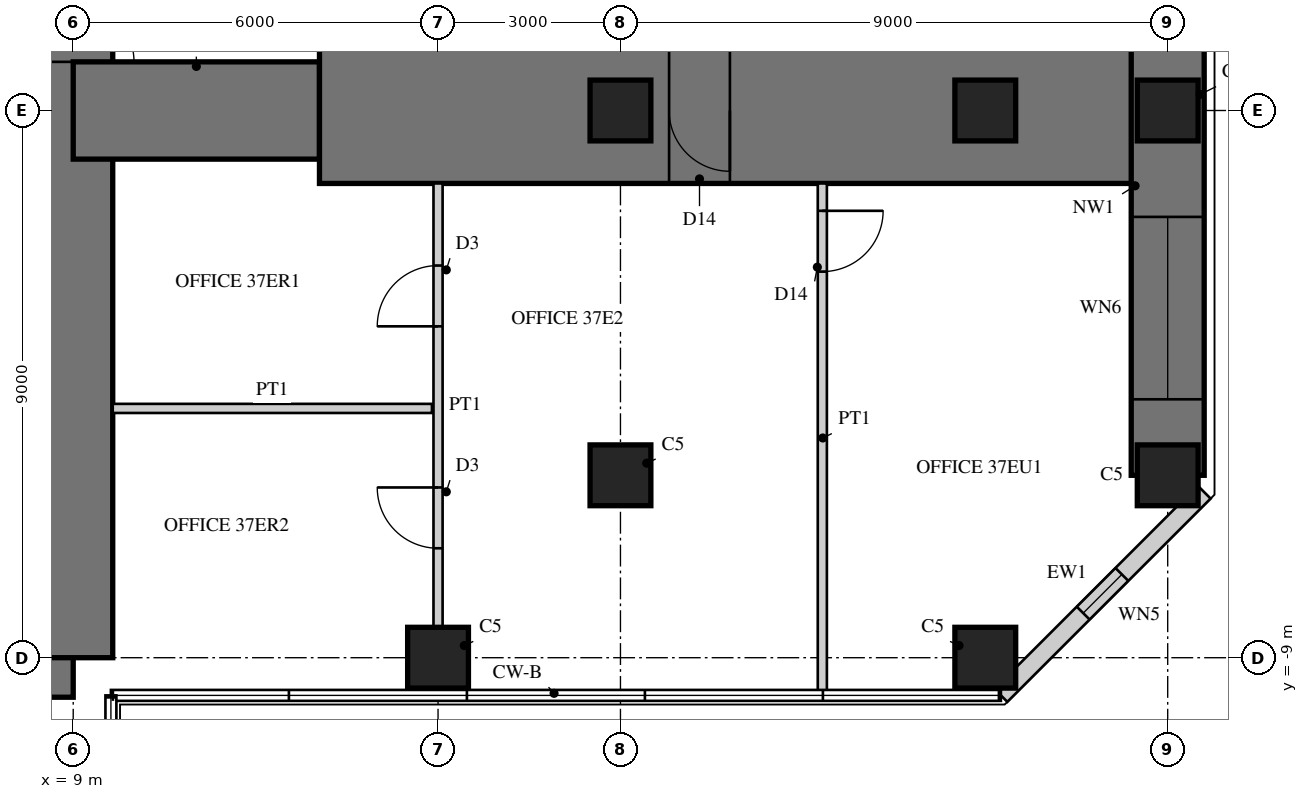
"""IFC4 building model, lengths in metres.
Left out: names, types, materials, properties, quantities, classifications, styles, units other than length and angle.
Written with IfcOpenShell. Run it as: python <this file> out.ifc"""

import sys

from ifc_helpers import new_model, si_unit, direction, frame, frame_2d, origin, origin_2d, place, context, subcontext, project, spatial, rectangle, hollow_rectangle, extrude, element, fill, save


model = new_model("IFC4")
c1 = context("Model", 3, precision=1e-05, world=origin(), true_north=direction((0.0, 1.0)))
c2 = subcontext(c1, "Body", "Model", "MODEL_VIEW")
j1 = project(units=[si_unit("LENGTHUNIT", "METRE"), si_unit("PLANEANGLEUNIT", "RADIAN")], contexts=[c1])
p1 = place(None, origin())
s1 = spatial("IfcSite", under=j1, at=p1, CompositionType="ELEMENT")
p2 = place(p1, origin())
s2 = spatial("IfcBuilding", under=s1, at=p2, CompositionType="ELEMENT")
p3 = place(p2, frame((0.0, 0.0, 152.5)))
s3 = spatial("IfcBuildingStorey", under=s2, at=p3, CompositionType="ELEMENT", Elevation=152.5)
p4 = place(p3, frame((-9.0, -9.0, 0.0), z_axis=(0.0, 0.0, 1.0), x_axis=(1.0, 0.0, 0.0)))
e1 = element("IfcWall", 1, at=p4, inside=s3, PredefinedType="SHEAR", context=c2, shape_type="SweptSolid", body=[
    extrude(rectangle(XDim=18.0, YDim=1.3, at=frame_2d((9.0, 0.0))), origin(), (0.0, 0.0, 1.0), 4.0),
])
p5 = place(p4, frame((9.8, 0.0, 0.0)))
e2 = element("IfcOpeningElement", 2, at=p5, cuts=e1, PredefinedType="OPENING", context=c2, shape_type="SweptSolid", body=[
    extrude(rectangle(XDim=1.0, YDim=2.4, at=frame_2d((0.5, 1.2))), frame((0.0, 0.66, 0.0), z_axis=(0.0, -1.0, 0.0), x_axis=(1.0, 0.0, 0.0)), (0.0, 0.0, 1.0), 1.32),
])
p6 = place(p3, frame((9.0, -9.0, 0.0), z_axis=(0.0, 0.0, 1.0), x_axis=(0.0, 1.0, 0.0)))
e3 = element("IfcWall", 3, at=p6, inside=s3, PredefinedType="SHEAR", context=c2, shape_type="SweptSolid", body=[
    extrude(rectangle(XDim=18.0, YDim=1.3, at=frame_2d((9.0, 0.0))), origin(), (0.0, 0.0, 1.0), 4.0),
])
p7 = place(p6, frame((9.8, 0.0, 0.0)))
e4 = element("IfcOpeningElement", 4, at=p7, cuts=e3, PredefinedType="OPENING", context=c2, shape_type="SweptSolid", body=[
    extrude(rectangle(XDim=1.0, YDim=2.4, at=frame_2d((0.5, 1.2))), frame((0.0, 0.66, 0.0), z_axis=(0.0, -1.0, 0.0), x_axis=(1.0, 0.0, 0.0)), (0.0, 0.0, 1.0), 1.32),
])
p8 = place(p3, frame((9.0, 0.0, 0.0), z_axis=(0.0, 0.0, 1.0), x_axis=(1.0, 0.0, 0.0)))
e5 = element("IfcWall", 5, at=p8, inside=s3, PredefinedType="SHEAR", context=c2, shape_type="SweptSolid", body=[
    extrude(rectangle(XDim=4.05, YDim=1.6, at=frame_2d((2.025, 0.0))), origin(), (0.0, 0.0, 1.0), 4.0),
])
p9 = place(p3, frame((13.05, 0.0, 0.0), z_axis=(0.0, 0.0, 1.0), x_axis=(1.0, 0.0, 0.0)))
e6 = element("IfcWall", 6, at=p9, inside=s3, PredefinedType="SHEAR", context=c2, shape_type="SweptSolid", body=[
    extrude(rectangle(XDim=13.95, YDim=2.4, at=frame_2d((6.975, 0.0))), origin(), (0.0, 0.0, 1.0), 4.0),
])
p10 = place(p9, frame((5.75, 0.0, 0.0)))
e7 = element("IfcOpeningElement", 7, at=p10, cuts=e6, PredefinedType="OPENING", context=c2, shape_type="SweptSolid", body=[
    extrude(rectangle(XDim=1.0, YDim=2.2, at=frame_2d((0.5, 1.1))), frame((0.0, 1.21, 0.0), z_axis=(0.0, -1.0, 0.0), x_axis=(1.0, 0.0, 0.0)), (0.0, 0.0, 1.0), 2.42),
])
p11 = place(p3, frame((27.0, -6.0, 0.0), z_axis=(0.0, 0.0, 1.0), x_axis=(0.0, 1.0, 0.0)))
e8 = element("IfcWall", 8, at=p11, inside=s3, PredefinedType="SHEAR", context=c2, shape_type="SweptSolid", body=[
    extrude(rectangle(XDim=12.0, YDim=1.2, at=frame_2d((6.0, 0.0))), origin(), (0.0, 0.0, 1.0), 4.0),
])
p12 = place(p11, frame((1.25, 0.0, 0.6)))
e9 = element("IfcOpeningElement", 9, at=p12, cuts=e8, PredefinedType="OPENING", context=c2, shape_type="SweptSolid", body=[
    extrude(rectangle(XDim=3.0, YDim=2.4, at=frame_2d((1.5, 1.2))), frame((0.0, 0.61, 0.0), z_axis=(0.0, -1.0, 0.0), x_axis=(1.0, 0.0, 0.0)), (0.0, 0.0, 1.0), 1.22),
])
p13 = place(p11, frame((7.75, 0.0, 0.6)))
e10 = element("IfcOpeningElement", 10, at=p13, cuts=e8, PredefinedType="OPENING", context=c2, shape_type="SweptSolid", body=[
    extrude(rectangle(XDim=3.0, YDim=2.4, at=frame_2d((1.5, 1.2))), frame((0.0, 0.61, 0.0), z_axis=(0.0, -1.0, 0.0), x_axis=(1.0, 0.0, 0.0)), (0.0, 0.0, 1.0), 1.22),
])
for number, where, z_axis, x_axis in (
    (11, (15.0, -9.0, 0.0), (0.0, 0.0, 1.0), (1.0, 0.0, 0.0)),
    (12, (24.0, -9.0, 0.0), (0.0, 0.0, 1.0), (1.0, 0.0, 0.0)),
    (13, (27.0, -6.0, 0.0), (0.0, 0.0, 1.0), (1.0, 0.0, 0.0)),
    (14, (27.0, 0.0, 0.0), (0.0, 0.0, 1.0), (1.0, 0.0, 0.0)),
    (15, (18.0, -6.0, 0.0), (0.0, 0.0, 1.0), (1.0, 0.0, 0.0)),
    (16, (18.0, 0.0, 0.0), (0.0, 0.0, 1.0), (1.0, 0.0, 0.0)),
    (17, (24.0, 0.0, 0.0), (0.0, 0.0, 1.0), (1.0, 0.0, 0.0)),
):
    element("IfcColumn", number, at=place(p3, frame(where, z_axis=z_axis, x_axis=x_axis)), inside=s3, PredefinedType="COLUMN", context=c2, shape_type="SweptSolid", body=[
        extrude(rectangle(XDim=1.0, YDim=1.0, at=origin_2d()), origin(), (0.0, 0.0, 1.0), 4.0),
    ])
p14 = place(p3, frame((24.257, -9.62, 0.0), z_axis=(0.0, 0.0, 1.0), x_axis=(0.707106781187, 0.707106781187, 0.0)))
e18 = element("IfcWall", 18, at=p14, inside=s3, PredefinedType="SOLIDWALL", context=c2, shape_type="SweptSolid", body=[
    extrude(rectangle(XDim=4.728, YDim=0.3, at=frame_2d((2.364, 0.0))), origin(), (0.0, 0.0, 1.0), 3.8),
])
p15 = place(p14, frame((1.914, 0.0, 0.3)))
e19 = element("IfcOpeningElement", 19, at=p15, cuts=e18, PredefinedType="OPENING", context=c2, shape_type="SweptSolid", body=[
    extrude(rectangle(XDim=0.9, YDim=2.4, at=frame_2d((0.45, 1.2))), frame((0.0, 0.16, 0.0), z_axis=(0.0, -1.0, 0.0), x_axis=(1.0, 0.0, 0.0)), (0.0, 0.0, 1.0), 0.32),
])
p16 = place(p3, frame((15.0, -8.5, 0.0), z_axis=(0.0, 0.0, 1.0), x_axis=(0.0, 1.0, 0.0)))
e20 = element("IfcWall", 20, at=p16, inside=s3, PredefinedType="PARTITIONING", context=c2, shape_type="SweptSolid", body=[
    extrude(rectangle(XDim=7.3, YDim=0.15, at=frame_2d((3.65, 0.0))), origin(), (0.0, 0.0, 1.0), 3.0),
])
p17 = place(p16, frame((1.3, 0.0, 0.0)))
e21 = element("IfcOpeningElement", 21, at=p17, cuts=e20, PredefinedType="OPENING", context=c2, shape_type="SweptSolid", body=[
    extrude(rectangle(XDim=1.0, YDim=2.1, at=frame_2d((0.5, 1.05))), frame((0.0, 0.085, 0.0), z_axis=(0.0, -1.0, 0.0), x_axis=(1.0, 0.0, 0.0)), (0.0, 0.0, 1.0), 0.17),
])
p18 = place(p16, frame((4.95, 0.0, 0.0)))
e22 = element("IfcOpeningElement", 22, at=p18, cuts=e20, PredefinedType="OPENING", context=c2, shape_type="SweptSolid", body=[
    extrude(rectangle(XDim=1.0, YDim=2.1, at=frame_2d((0.5, 1.05))), frame((0.0, 0.085, 0.0), z_axis=(0.0, -1.0, 0.0), x_axis=(1.0, 0.0, 0.0)), (0.0, 0.0, 1.0), 0.17),
])
p19 = place(p3, frame((9.65, -4.9, 0.0), z_axis=(0.0, 0.0, 1.0), x_axis=(1.0, 0.0, 0.0)))
e23 = element("IfcWall", 23, at=p19, inside=s3, PredefinedType="PARTITIONING", context=c2, shape_type="SweptSolid", body=[
    extrude(rectangle(XDim=5.25, YDim=0.15, at=frame_2d((2.625, 0.0))), origin(), (0.0, 0.0, 1.0), 3.8),
])
p20 = place(p3, frame((21.32, -9.58, 0.0), z_axis=(0.0, 0.0, 1.0), x_axis=(0.0, 1.0, 0.0)))
e24 = element("IfcWall", 24, at=p20, inside=s3, PredefinedType="PARTITIONING", context=c2, shape_type="SweptSolid", body=[
    extrude(rectangle(XDim=8.38, YDim=0.15, at=frame_2d((4.19, 0.0))), origin(), (0.0, 0.0, 1.0), 3.8),
])
p21 = place(p20, frame((6.93, 0.0, 0.0)))
e25 = element("IfcOpeningElement", 25, at=p21, cuts=e24, PredefinedType="OPENING", context=c2, shape_type="SweptSolid", body=[
    extrude(rectangle(XDim=1.0, YDim=2.2, at=frame_2d((0.5, 1.1))), frame((0.0, 0.085, 0.0), z_axis=(0.0, -1.0, 0.0), x_axis=(1.0, 0.0, 0.0)), (0.0, 0.0, 1.0), 0.17),
])
p22 = place(p15, origin())
e26 = element("IfcWindow", 26, at=p22, inside=s3, PartitioningType="SINGLE_PANEL", PredefinedType="WINDOW", context=c2, shape_type="SweptSolid", body=[
    extrude(hollow_rectangle(XDim=0.9, YDim=2.4, WallThickness=0.06, at=frame_2d((0.45, 1.2))), frame((0.0, 0.03, 0.0), z_axis=(0.0, -1.0, 0.0), x_axis=(1.0, 0.0, 0.0)), (0.0, 0.0, 1.0), 0.06),
    extrude(rectangle(XDim=0.779, YDim=2.279, at=frame_2d((0.45, 1.2))), frame((0.0, 0.03, 0.0), z_axis=(0.0, -1.0, 0.0), x_axis=(1.0, 0.0, 0.0)), (0.0, 0.0, 1.0), 0.06),
])
fill(e19, e26)
p23 = place(p12, origin())
e27 = element("IfcWindow", 27, at=p23, inside=s3, PartitioningType="SINGLE_PANEL", PredefinedType="WINDOW", context=c2, shape_type="SweptSolid", body=[
    extrude(hollow_rectangle(XDim=3.0, YDim=2.4, WallThickness=0.06, at=frame_2d((1.5, 1.2))), frame((0.0, 0.03, 0.0), z_axis=(0.0, -1.0, 0.0), x_axis=(1.0, 0.0, 0.0)), (0.0, 0.0, 1.0), 0.06),
    extrude(rectangle(XDim=2.879, YDim=2.279, at=frame_2d((1.5, 1.2))), frame((0.0, 0.03, 0.0), z_axis=(0.0, -1.0, 0.0), x_axis=(1.0, 0.0, 0.0)), (0.0, 0.0, 1.0), 0.06),
])
fill(e9, e27)
p24 = place(p17, origin())
e28 = element("IfcDoor", 28, at=p24, inside=s3, OperationType="SINGLE_SWING_RIGHT", PredefinedType="DOOR", context=c2, shape_type="SweptSolid", body=[
    extrude(rectangle(XDim=1.0, YDim=2.1, at=frame_2d((0.5, 1.05))), frame((0.0, 0.025, 0.0), z_axis=(0.0, -1.0, 0.0), x_axis=(1.0, 0.0, 0.0)), (0.0, 0.0, 1.0), 0.05),
])
fill(e21, e28)
p25 = place(p18, origin())
e29 = element("IfcDoor", 29, at=p25, inside=s3, OperationType="SINGLE_SWING_LEFT", PredefinedType="DOOR", context=c2, shape_type="SweptSolid", body=[
    extrude(rectangle(XDim=1.0, YDim=2.1, at=frame_2d((0.5, 1.05))), frame((0.0, 0.025, 0.0), z_axis=(0.0, -1.0, 0.0), x_axis=(1.0, 0.0, 0.0)), (0.0, 0.0, 1.0), 0.05),
])
fill(e22, e29)
p26 = place(p21, frame((1.0, 0.0, 0.0), z_axis=(0.0, 0.0, 1.0), x_axis=(-1.0, 0.0, 0.0)))
e30 = element("IfcDoor", 30, at=p26, inside=s3, OperationType="SINGLE_SWING_LEFT", PredefinedType="DOOR", context=c2, shape_type="SweptSolid", body=[
    extrude(rectangle(XDim=1.0, YDim=2.2, at=frame_2d((0.5, 1.1))), frame((0.0, 0.025, 0.0), z_axis=(0.0, -1.0, 0.0), x_axis=(1.0, 0.0, 0.0)), (0.0, 0.0, 1.0), 0.05),
])
fill(e25, e30)
p27 = place(p10, frame((1.0, 0.0, 0.0), z_axis=(0.0, 0.0, 1.0), x_axis=(-1.0, 0.0, 0.0)))
e31 = element("IfcDoor", 31, at=p27, inside=s3, OperationType="SINGLE_SWING_LEFT", PredefinedType="DOOR", context=c2, shape_type="SweptSolid", body=[
    extrude(rectangle(XDim=1.0, YDim=2.2, at=frame_2d((0.5, 1.1))), frame((0.0, 0.025, 0.0), z_axis=(0.0, -1.0, 0.0), x_axis=(1.0, 0.0, 0.0)), (0.0, 0.0, 1.0), 0.05),
])
fill(e7, e31)
p28 = place(p7, frame((1.0, 0.0, 0.0), z_axis=(0.0, 0.0, 1.0), x_axis=(-1.0, 0.0, 0.0)))
e32 = element("IfcDoor", 32, at=p28, inside=s3, OperationType="SINGLE_SWING_RIGHT", PredefinedType="DOOR", context=c2, shape_type="SweptSolid", body=[
    extrude(rectangle(XDim=1.0, YDim=2.4, at=frame_2d((0.5, 1.2))), frame((0.0, -0.005, 0.0), z_axis=(0.0, -1.0, 0.0), x_axis=(1.0, 0.0, 0.0)), (0.0, 0.0, 1.0), 0.05),
])
fill(e4, e32)
save(model, sys.argv[1])
